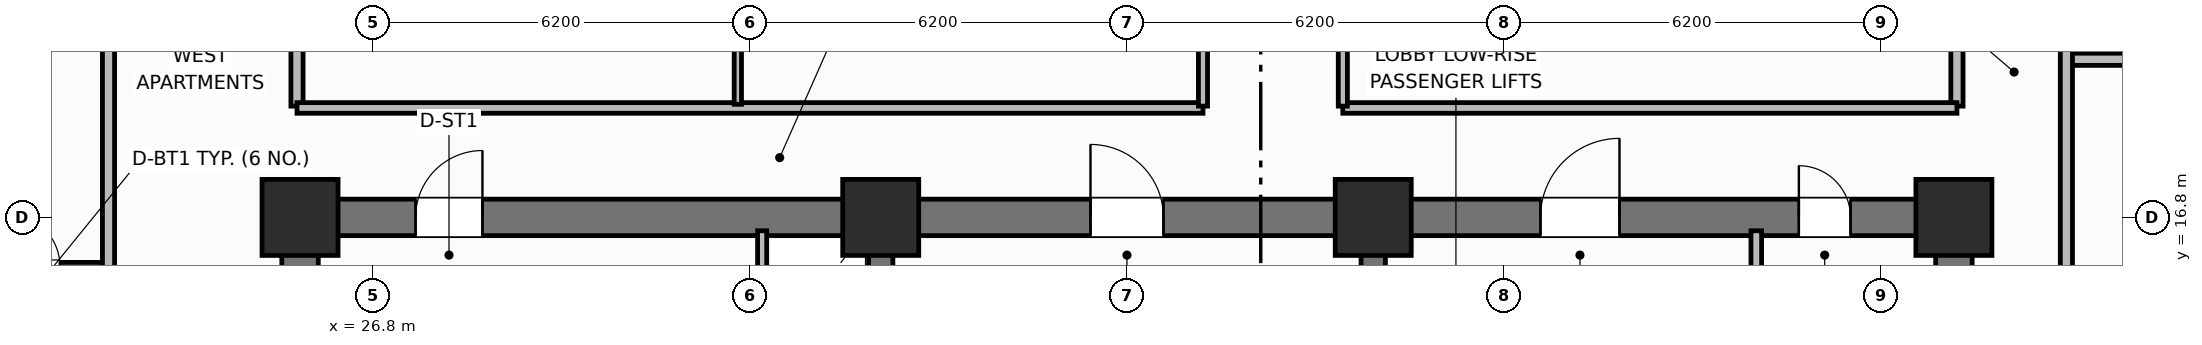
"""IFC4 building model, lengths in metres.
Left out: names, types, materials, properties, quantities, classifications, styles, units other than length and angle.
Written with IfcOpenShell. Run it as: python <this file> out.ifc"""

import sys

from ifc_helpers import new_model, si_unit, direction, frame, frame_2d, origin, origin_2d, place, context, subcontext, project, spatial, rectangle, extrude, element, fill, save


model = new_model("IFC4")
c1 = context("Model", 3, precision=1e-05, world=origin(), true_north=direction((0.0, 1.0)))
c2 = subcontext(c1, "Body", "Model", "MODEL_VIEW")
j1 = project(units=[si_unit("LENGTHUNIT", "METRE"), si_unit("PLANEANGLEUNIT", "RADIAN")], contexts=[c1])
p1 = place(None, origin())
s1 = spatial("IfcSite", under=j1, at=p1, CompositionType="ELEMENT")
p2 = place(p1, origin())
s2 = spatial("IfcBuilding", under=s1, at=p2, CompositionType="ELEMENT")
p3 = place(p2, frame((0.0, 0.0, 58.4)))
s3 = spatial("IfcBuildingStorey", under=s2, at=p3, CompositionType="ELEMENT", Elevation=58.4)
for number, where, z_axis, x_axis in (
    (1, (25.6, 10.9, 0.0), (0.0, 0.0, 1.0), (0.0, 1.0, 0.0)),
    (2, (52.8, 10.9, 0.0), (0.0, 0.0, 1.0), (0.0, 1.0, 0.0)),
):
    element("IfcWall", number, at=place(p3, frame(where, z_axis=z_axis, x_axis=x_axis)), inside=s3, PredefinedType="SHEAR", context=c2, shape_type="SweptSolid", body=[
        extrude(rectangle(XDim=5.6, YDim=0.6, at=frame_2d((2.8, 0.0))), origin(), (0.0, 0.0, 1.0), 3.7),
    ])
p4 = place(p3, frame((25.6, 16.8, 0.0), z_axis=(0.0, 0.0, 1.0), x_axis=(1.0, 0.0, 0.0)))
e3 = element("IfcWall", 3, at=p4, inside=s3, PredefinedType="SHEAR", context=c2, shape_type="SweptSolid", body=[
    extrude(rectangle(XDim=27.2, YDim=0.6, at=frame_2d((13.6, 0.0))), origin(), (0.0, 0.0, 1.0), 3.7),
])
p5 = place(p4, frame((1.9, 0.0, 0.0)))
e4 = element("IfcOpeningElement", 4, at=p5, cuts=e3, PredefinedType="OPENING", context=c2, shape_type="SweptSolid", body=[
    extrude(rectangle(XDim=1.1, YDim=2.15, at=frame_2d((0.55, 1.075))), frame((0.0, 0.31, 0.0), z_axis=(0.0, -1.0, 0.0), x_axis=(1.0, 0.0, 0.0)), (0.0, 0.0, 1.0), 0.62),
])
p6 = place(p4, frame((13.0, 0.0, 0.0)))
e5 = element("IfcOpeningElement", 5, at=p6, cuts=e3, PredefinedType="OPENING", context=c2, shape_type="SweptSolid", body=[
    extrude(rectangle(XDim=1.2, YDim=2.15, at=frame_2d((0.6, 1.075))), frame((0.0, 0.31, 0.0), z_axis=(0.0, -1.0, 0.0), x_axis=(1.0, 0.0, 0.0)), (0.0, 0.0, 1.0), 0.62),
])
p7 = place(p4, frame((20.4, 0.0, 0.0)))
e6 = element("IfcOpeningElement", 6, at=p7, cuts=e3, PredefinedType="OPENING", context=c2, shape_type="SweptSolid", body=[
    extrude(rectangle(XDim=1.3, YDim=2.2, at=frame_2d((0.65, 1.1))), frame((0.0, 0.31, 0.0), z_axis=(0.0, -1.0, 0.0), x_axis=(1.0, 0.0, 0.0)), (0.0, 0.0, 1.0), 0.62),
])
p8 = place(p4, frame((24.65, 0.0, 0.0)))
e7 = element("IfcOpeningElement", 7, at=p8, cuts=e3, PredefinedType="OPENING", context=c2, shape_type="SweptSolid", body=[
    extrude(rectangle(XDim=0.85, YDim=2.1, at=frame_2d((0.425, 1.05))), frame((0.0, 0.31, 0.0), z_axis=(0.0, -1.0, 0.0), x_axis=(1.0, 0.0, 0.0)), (0.0, 0.0, 1.0), 0.62),
])
for number, where, z_axis, x_axis in (
    (8, (35.15, 10.9, 0.0), (0.0, 0.0, 1.0), (0.0, 1.0, 0.0)),
    (9, (43.25, 10.9, 0.0), (0.0, 0.0, 1.0), (0.0, 1.0, 0.0)),
):
    element("IfcWall", number, at=place(p3, frame(where, z_axis=z_axis, x_axis=x_axis)), inside=s3, PredefinedType="SHEAR", context=c2, shape_type="SweptSolid", body=[
        extrude(rectangle(XDim=5.6, YDim=0.4, at=frame_2d((2.8, 0.0))), origin(), (0.0, 0.0, 1.0), 3.7),
    ])
for number, where, z_axis, x_axis in (
    (10, (25.6, 16.8, 0.0), (0.0, 0.0, 1.0), (1.0, 0.0, 0.0)),
    (11, (35.15, 16.8, 0.0), (0.0, 0.0, 1.0), (1.0, 0.0, 0.0)),
    (12, (43.25, 16.8, 0.0), (0.0, 0.0, 1.0), (1.0, 0.0, 0.0)),
    (13, (52.8, 16.8, 0.0), (0.0, 0.0, 1.0), (1.0, 0.0, 0.0)),
):
    element("IfcColumn", number, at=place(p3, frame(where, z_axis=z_axis, x_axis=x_axis)), inside=s3, PredefinedType="COLUMN", context=c2, shape_type="SweptSolid", body=[
        extrude(rectangle(XDim=1.25, YDim=1.25, at=origin_2d()), origin(), (0.0, 0.0, 1.0), 3.7),
    ])
p9 = place(p3, frame((33.2, 14.5, 0.0), z_axis=(0.0, 0.0, 1.0), x_axis=(0.0, 1.0, 0.0)))
e14 = element("IfcWall", 14, at=p9, inside=s3, PredefinedType="PARTITIONING", context=c2, shape_type="SweptSolid", body=[
    extrude(rectangle(XDim=2.08, YDim=0.15, at=frame_2d((1.04, 0.0))), origin(), (0.0, 0.0, 1.0), 2.53),
])
p10 = place(p9, frame((0.55, 0.0, 0.0)))
e15 = element("IfcOpeningElement", 15, at=p10, cuts=e14, PredefinedType="OPENING", context=c2, shape_type="SweptSolid", body=[
    extrude(rectangle(XDim=0.85, YDim=2.05, at=frame_2d((0.425, 1.025))), frame((0.0, 0.085, 0.0), z_axis=(0.0, -1.0, 0.0), x_axis=(1.0, 0.0, 0.0)), (0.0, 0.0, 1.0), 0.17),
])
p11 = place(p3, frame((49.55, 13.7, 0.0), z_axis=(0.0, 0.0, 1.0), x_axis=(0.0, 1.0, 0.0)))
e16 = element("IfcWall", 16, at=p11, inside=s3, PredefinedType="PARTITIONING", context=c2, shape_type="SweptSolid", body=[
    extrude(rectangle(XDim=2.88, YDim=0.175, at=frame_2d((1.44, 0.0))), origin(), (0.0, 0.0, 1.0), 2.53),
])
for number, where, z_axis, x_axis in (
    (17, (25.55, 18.63, 0.0), (0.0, 0.0, 1.0), (0.0, 1.0, 0.0)),
    (18, (52.85, 18.63, 0.0), (0.0, 0.0, 1.0), (0.0, 1.0, 0.0)),
):
    element("IfcWall", number, at=place(p3, frame(where, z_axis=z_axis, x_axis=x_axis)), inside=s3, PredefinedType="PARTITIONING", context=c2, shape_type="SweptSolid", body=[
        extrude(rectangle(XDim=19.14, YDim=0.2, at=frame_2d((9.57, 0.0))), origin(), (0.0, 0.0, 1.0), 2.53),
    ])
p12 = place(p3, frame((25.55, 18.6, 0.0), z_axis=(0.0, 0.0, 1.0), x_axis=(1.0, 0.0, 0.0)))
e19 = element("IfcWall", 19, at=p12, inside=s3, PredefinedType="PARTITIONING", context=c2, shape_type="SweptSolid", body=[
    extrude(rectangle(XDim=14.9, YDim=0.175, at=frame_2d((7.45, 0.0))), origin(), (0.0, 0.0, 1.0), 2.53),
])
p13 = place(p3, frame((42.75, 18.6, 0.0), z_axis=(0.0, 0.0, 1.0), x_axis=(1.0, 0.0, 0.0)))
e20 = element("IfcWall", 20, at=p13, inside=s3, PredefinedType="PARTITIONING", context=c2, shape_type="SweptSolid", body=[
    extrude(rectangle(XDim=10.1, YDim=0.175, at=frame_2d((5.05, 0.0))), origin(), (0.0, 0.0, 1.0), 2.53),
])
p14 = place(p3, frame((32.8, 18.66, 0.0), z_axis=(0.0, 0.0, 1.0), x_axis=(0.0, 1.0, 0.0)))
e21 = element("IfcWall", 21, at=p14, inside=s3, PredefinedType="PARTITIONING", context=c2, shape_type="SweptSolid", body=[
    extrude(rectangle(XDim=9.49, YDim=0.12, at=frame_2d((4.745, 0.0))), origin(), (0.0, 0.0, 1.0), 2.53),
])
p15 = place(p14, frame((2.2, 0.0, 0.0)))
e22 = element("IfcOpeningElement", 22, at=p15, cuts=e21, PredefinedType="OPENING", context=c2, shape_type="SweptSolid", body=[
    extrude(rectangle(XDim=0.9, YDim=2.1, at=frame_2d((0.45, 1.05))), frame((0.0, 0.07, 0.0), z_axis=(0.0, -1.0, 0.0), x_axis=(1.0, 0.0, 0.0)), (0.0, 0.0, 1.0), 0.14),
])
p16 = place(p3, frame((40.45, 18.63, 0.0), z_axis=(0.0, 0.0, 1.0), x_axis=(0.0, 1.0, 0.0)))
e23 = element("IfcWall", 23, at=p16, inside=s3, PredefinedType="PARTITIONING", context=c2, shape_type="SweptSolid", body=[
    extrude(rectangle(XDim=19.14, YDim=0.15, at=frame_2d((9.57, 0.0))), origin(), (0.0, 0.0, 1.0), 2.53),
])
p17 = place(p16, frame((2.4, 0.0, 0.0)))
e24 = element("IfcOpeningElement", 24, at=p17, cuts=e23, PredefinedType="OPENING", context=c2, shape_type="SweptSolid", body=[
    extrude(rectangle(XDim=1.0, YDim=2.15, at=frame_2d((0.5, 1.075))), frame((0.0, 0.085, 0.0), z_axis=(0.0, -1.0, 0.0), x_axis=(1.0, 0.0, 0.0)), (0.0, 0.0, 1.0), 0.17),
])
p18 = place(p16, frame((11.4, 0.0, 0.0)))
e25 = element("IfcOpeningElement", 25, at=p18, cuts=e23, PredefinedType="OPENING", context=c2, shape_type="SweptSolid", body=[
    extrude(rectangle(XDim=1.0, YDim=2.15, at=frame_2d((0.5, 1.075))), frame((0.0, 0.085, 0.0), z_axis=(0.0, -1.0, 0.0), x_axis=(1.0, 0.0, 0.0)), (0.0, 0.0, 1.0), 0.17),
])
p19 = place(p3, frame((42.75, 18.63, 0.0), z_axis=(0.0, 0.0, 1.0), x_axis=(0.0, 1.0, 0.0)))
e26 = element("IfcWall", 26, at=p19, inside=s3, PredefinedType="PARTITIONING", context=c2, shape_type="SweptSolid", body=[
    extrude(rectangle(XDim=19.14, YDim=0.15, at=frame_2d((9.57, 0.0))), origin(), (0.0, 0.0, 1.0), 2.53),
])
p20 = place(p19, frame((5.5, 0.0, 0.0)))
e27 = element("IfcOpeningElement", 27, at=p20, cuts=e26, PredefinedType="OPENING", context=c2, shape_type="SweptSolid", body=[
    extrude(rectangle(XDim=1.0, YDim=2.15, at=frame_2d((0.5, 1.075))), frame((0.0, 0.085, 0.0), z_axis=(0.0, -1.0, 0.0), x_axis=(1.0, 0.0, 0.0)), (0.0, 0.0, 1.0), 0.17),
])
p21 = place(p3, frame((20.2, 16.0, 0.0), z_axis=(0.0, 0.0, 1.0), x_axis=(1.0, 0.0, 0.0)))
e28 = element("IfcWall", 28, at=p21, inside=s3, PredefinedType="PARTITIONING", context=c2, shape_type="SweptSolid", body=[
    extrude(rectangle(XDim=2.25, YDim=0.12, at=frame_2d((1.125, 0.0))), origin(), (0.0, 0.0, 1.0), 2.53),
])
p22 = place(p21, frame((0.6, 0.0, 0.0)))
e29 = element("IfcOpeningElement", 29, at=p22, cuts=e28, PredefinedType="OPENING", context=c2, shape_type="SweptSolid", body=[
    extrude(rectangle(XDim=0.85, YDim=2.1, at=frame_2d((0.425, 1.05))), frame((0.0, 0.07, 0.0), z_axis=(0.0, -1.0, 0.0), x_axis=(1.0, 0.0, 0.0)), (0.0, 0.0, 1.0), 0.14),
])
p23 = place(p3, frame((22.45, 10.6, 0.0), z_axis=(0.0, 0.0, 1.0), x_axis=(0.0, 1.0, 0.0)))
e30 = element("IfcWall", 30, at=p23, inside=s3, PredefinedType="PARTITIONING", context=c2, shape_type="SweptSolid", body=[
    extrude(rectangle(XDim=35.2, YDim=0.2, at=frame_2d((17.6, 0.0))), origin(), (0.0, 0.0, 1.0), 2.53),
])
p24 = place(p23, frame((2.65, 0.0, 0.0)))
e31 = element("IfcOpeningElement", 31, at=p24, cuts=e30, PredefinedType="OPENING", context=c2, shape_type="SweptSolid", body=[
    extrude(rectangle(XDim=1.0, YDim=2.15, at=frame_2d((0.5, 1.075))), frame((0.0, 0.11, 0.0), z_axis=(0.0, -1.0, 0.0), x_axis=(1.0, 0.0, 0.0)), (0.0, 0.0, 1.0), 0.22),
])
p25 = place(p23, frame((19.438, 0.0, 0.0)))
e32 = element("IfcOpeningElement", 32, at=p25, cuts=e30, PredefinedType="OPENING", context=c2, shape_type="SweptSolid", body=[
    extrude(rectangle(XDim=1.0, YDim=2.15, at=frame_2d((0.5, 1.075))), frame((0.0, 0.11, 0.0), z_axis=(0.0, -1.0, 0.0), x_axis=(1.0, 0.0, 0.0)), (0.0, 0.0, 1.0), 0.22),
])
p26 = place(p3, frame((54.65, 19.4, 0.0), z_axis=(0.0, 0.0, 1.0), x_axis=(1.0, 0.0, 0.0)))
e33 = element("IfcWall", 33, at=p26, inside=s3, PredefinedType="PARTITIONING", context=c2, shape_type="SweptSolid", body=[
    extrude(rectangle(XDim=9.18, YDim=0.2, at=frame_2d((4.59, 0.0))), origin(), (0.0, 0.0, 1.0), 2.53),
])
p27 = place(p3, frame((54.65, 10.6, 0.0), z_axis=(0.0, 0.0, 1.0), x_axis=(0.0, 1.0, 0.0)))
e34 = element("IfcWall", 34, at=p27, inside=s3, PredefinedType="PARTITIONING", context=c2, shape_type="SweptSolid", body=[
    extrude(rectangle(XDim=35.2, YDim=0.2, at=frame_2d((17.6, 0.0))), origin(), (0.0, 0.0, 1.0), 2.53),
])
p28 = place(p27, frame((2.65, 0.0, 0.0)))
e35 = element("IfcOpeningElement", 35, at=p28, cuts=e34, PredefinedType="OPENING", context=c2, shape_type="SweptSolid", body=[
    extrude(rectangle(XDim=1.0, YDim=2.15, at=frame_2d((0.5, 1.075))), frame((0.0, 0.11, 0.0), z_axis=(0.0, -1.0, 0.0), x_axis=(1.0, 0.0, 0.0)), (0.0, 0.0, 1.0), 0.22),
])
p29 = place(p27, frame((10.81, 0.0, 0.0)))
e36 = element("IfcOpeningElement", 36, at=p29, cuts=e34, PredefinedType="OPENING", context=c2, shape_type="SweptSolid", body=[
    extrude(rectangle(XDim=1.0, YDim=2.15, at=frame_2d((0.5, 1.075))), frame((0.0, 0.11, 0.0), z_axis=(0.0, -1.0, 0.0), x_axis=(1.0, 0.0, 0.0)), (0.0, 0.0, 1.0), 0.22),
])
p30 = place(p27, frame((19.54, 0.0, 0.0)))
e37 = element("IfcOpeningElement", 37, at=p30, cuts=e34, PredefinedType="OPENING", context=c2, shape_type="SweptSolid", body=[
    extrude(rectangle(XDim=1.0, YDim=2.15, at=frame_2d((0.5, 1.075))), frame((0.0, 0.11, 0.0), z_axis=(0.0, -1.0, 0.0), x_axis=(1.0, 0.0, 0.0)), (0.0, 0.0, 1.0), 0.22),
])
p31 = place(p27, frame((26.95, 0.0, 0.0)))
e38 = element("IfcOpeningElement", 38, at=p31, cuts=e34, PredefinedType="OPENING", context=c2, shape_type="SweptSolid", body=[
    extrude(rectangle(XDim=1.0, YDim=2.15, at=frame_2d((0.5, 1.075))), frame((0.0, 0.11, 0.0), z_axis=(0.0, -1.0, 0.0), x_axis=(1.0, 0.0, 0.0)), (0.0, 0.0, 1.0), 0.22),
])
p32 = place(p22, origin())
e39 = element("IfcDoor", 39, at=p32, inside=s3, OperationType="SINGLE_SWING_LEFT", PredefinedType="DOOR", context=c2, shape_type="SweptSolid", body=[
    extrude(rectangle(XDim=0.85, YDim=2.1, at=frame_2d((0.425, 1.05))), frame((0.0, 0.025, 0.0), z_axis=(0.0, -1.0, 0.0), x_axis=(1.0, 0.0, 0.0)), (0.0, 0.0, 1.0), 0.05),
])
fill(e29, e39)
p33 = place(p5, origin())
e40 = element("IfcDoor", 40, at=p33, inside=s3, OperationType="SINGLE_SWING_RIGHT", PredefinedType="DOOR", context=c2, shape_type="SweptSolid", body=[
    extrude(rectangle(XDim=1.1, YDim=2.15, at=frame_2d((0.55, 1.075))), frame((0.0, 0.025, 0.0), z_axis=(0.0, -1.0, 0.0), x_axis=(1.0, 0.0, 0.0)), (0.0, 0.0, 1.0), 0.05),
])
fill(e4, e40)
p34 = place(p6, origin())
e41 = element("IfcDoor", 41, at=p34, inside=s3, OperationType="SINGLE_SWING_LEFT", PredefinedType="DOOR", context=c2, shape_type="SweptSolid", body=[
    extrude(rectangle(XDim=1.2, YDim=2.15, at=frame_2d((0.6, 1.075))), frame((0.0, 0.025, 0.0), z_axis=(0.0, -1.0, 0.0), x_axis=(1.0, 0.0, 0.0)), (0.0, 0.0, 1.0), 0.05),
])
fill(e5, e41)
p35 = place(p7, origin())
e42 = element("IfcDoor", 42, at=p35, inside=s3, OperationType="SINGLE_SWING_RIGHT", PredefinedType="DOOR", context=c2, shape_type="SweptSolid", body=[
    extrude(rectangle(XDim=1.3, YDim=2.2, at=frame_2d((0.65, 1.1))), frame((0.0, 0.025, 0.0), z_axis=(0.0, -1.0, 0.0), x_axis=(1.0, 0.0, 0.0)), (0.0, 0.0, 1.0), 0.05),
])
fill(e6, e42)
p36 = place(p8, origin())
e43 = element("IfcDoor", 43, at=p36, inside=s3, OperationType="SINGLE_SWING_LEFT", PredefinedType="DOOR", context=c2, shape_type="SweptSolid", body=[
    extrude(rectangle(XDim=0.85, YDim=2.1, at=frame_2d((0.425, 1.05))), frame((0.0, 0.025, 0.0), z_axis=(0.0, -1.0, 0.0), x_axis=(1.0, 0.0, 0.0)), (0.0, 0.0, 1.0), 0.05),
])
fill(e7, e43)
save(model, sys.argv[1])
